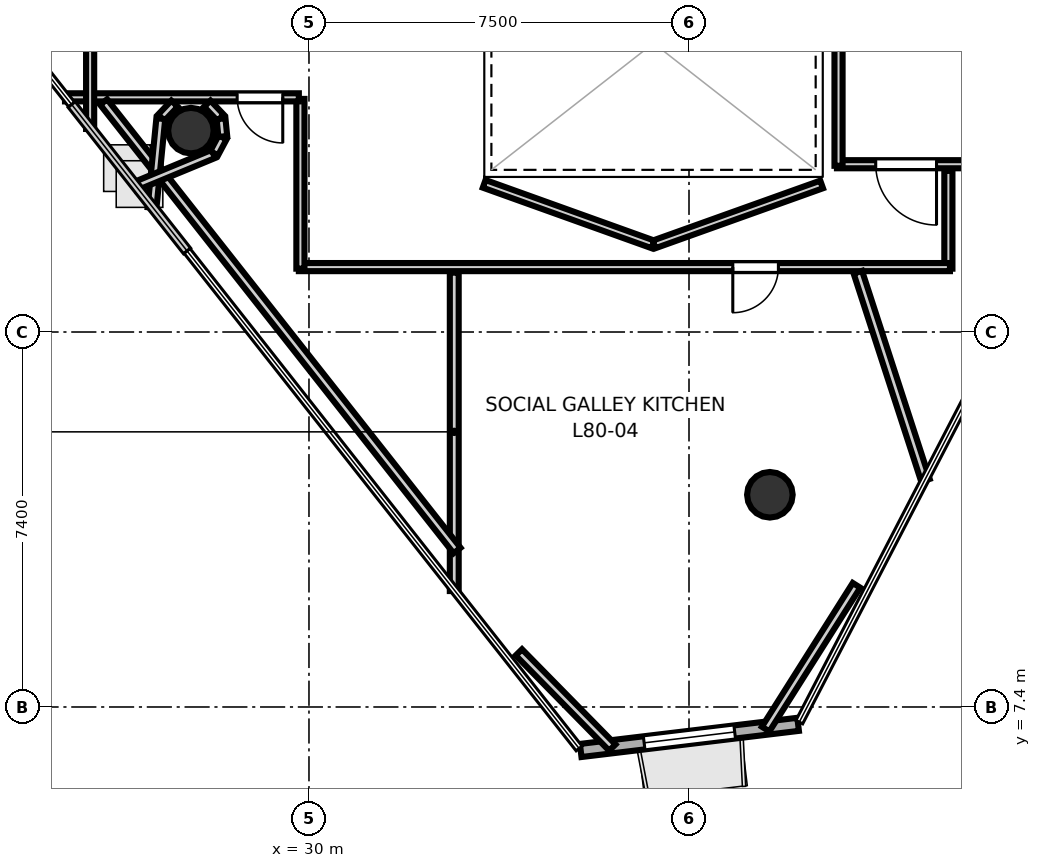
"""IFC4 building model, lengths in metres.
Left out: names, types, materials, properties, quantities, classifications, styles, units other than length and angle.
Written with IfcOpenShell. Run it as: python <this file> out.ifc"""

import sys

from ifc_helpers import new_model, si_unit, direction, frame, frame_2d, origin, origin_2d, place, context, subcontext, project, spatial, rectangle, hollow_circle, extrude, element, fill, save


model = new_model("IFC4")
c1 = context("Model", 3, precision=1e-05, world=origin(), true_north=direction((0.0, 1.0)))
c2 = subcontext(c1, "Body", "Model", "MODEL_VIEW")
j1 = project(units=[si_unit("LENGTHUNIT", "METRE"), si_unit("PLANEANGLEUNIT", "RADIAN")], contexts=[c1])
p1 = place(None, origin())
s1 = spatial("IfcSite", under=j1, at=p1, CompositionType="ELEMENT")
p2 = place(p1, origin())
s2 = spatial("IfcBuilding", under=s1, at=p2, CompositionType="ELEMENT")
p3 = place(p2, frame((0.0, 0.0, 310.2)))
s3 = spatial("IfcBuildingStorey", under=s2, at=p3, CompositionType="ELEMENT", Elevation=310.2)
for number, where, z_axis, x_axis in (
    (1, (27.67, 18.774, 0.0), (0.0, 0.0, 1.0), (1.0, 0.0, 0.0)),
    (2, (39.096, 11.588, 0.0), (0.0, 0.0, 1.0), (1.0, 0.0, 0.0)),
):
    element("IfcColumn", number, at=place(p3, frame(where, z_axis=z_axis, x_axis=x_axis)), inside=s3, PredefinedType="COLUMN", context=c2, shape_type="SweptSolid", body=[
        extrude(hollow_circle(Radius=0.45, WallThickness=0.025, at=origin_2d()), origin(), (0.0, 0.0, 1.0), 3.7),
    ])
p4 = place(p3, frame((35.363, 6.542, 0.0), z_axis=(0.0, 0.0, 1.0), x_axis=(0.992851691793, 0.119354589791, 0.0)))
e3 = element("IfcWall", 3, at=p4, inside=s3, PredefinedType="SOLIDWALL", context=c2, shape_type="SweptSolid", body=[
    extrude(rectangle(XDim=4.322, YDim=0.26, at=frame_2d((2.161, 0.0))), origin(), (0.0, 0.0, 1.0), 3.52),
])
p5 = place(p4, frame((1.261, 0.0, 0.85)))
e4 = element("IfcOpeningElement", 4, at=p5, cuts=e3, PredefinedType="OPENING", context=c2, shape_type="SweptSolid", body=[
    extrude(rectangle(XDim=1.8, YDim=2.1, at=frame_2d((0.9, 1.05))), frame((0.0, 0.14, 0.0), z_axis=(0.0, -1.0, 0.0), x_axis=(1.0, 0.0, 0.0)), (0.0, 0.0, 1.0), 0.28),
])
p6 = place(p3, frame((43.15, 18.111, 0.0), z_axis=(0.0, 0.0, 1.0), x_axis=(-1.0, 0.0, 0.0)))
e5 = element("IfcWall", 5, at=p6, inside=s3, PredefinedType="PARTITIONING", context=c2, shape_type="SweptSolid", body=[
    extrude(rectangle(XDim=2.73, YDim=0.16, at=frame_2d((1.365, 0.0))), origin(), (0.0, 0.0, 1.0), 2.84),
])
p7 = place(p6, frame((0.765, 0.0, 0.0)))
e6 = element("IfcOpeningElement", 6, at=p7, cuts=e5, PredefinedType="OPENING", context=c2, shape_type="SweptSolid", body=[
    extrude(rectangle(XDim=1.2, YDim=2.15, at=frame_2d((0.6, 1.075))), frame((0.0, 0.09, 0.0), z_axis=(0.0, -1.0, 0.0), x_axis=(1.0, 0.0, 0.0)), (0.0, 0.0, 1.0), 0.18),
])
p8 = place(p3, frame((40.451, 18.08, 0.0), z_axis=(0.0, 0.0, 1.0), x_axis=(0.0, 1.0, 0.0)))
e7 = element("IfcWall", 7, at=p8, inside=s3, PredefinedType="PARTITIONING", context=c2, shape_type="SweptSolid", body=[
    extrude(rectangle(XDim=3.32, YDim=0.16, at=frame_2d((1.66, 0.0))), origin(), (0.0, 0.0, 1.0), 2.84),
])
p9 = place(p3, frame((33.458, 17.724, 0.0), z_axis=(0.0, 0.0, 1.0), x_axis=(0.94128854789, -0.337603124408, 0.0)))
e8 = element("IfcWall", 8, at=p9, inside=s3, PredefinedType="PARTITIONING", context=c2, shape_type="SweptSolid", body=[
    extrude(rectangle(XDim=3.54, YDim=0.16, at=frame_2d((1.77, 0.0))), origin(), (0.0, 0.0, 1.0), 2.84),
])
p10 = place(p3, frame((36.81, 16.529, 0.0), z_axis=(0.0, 0.0, 1.0), x_axis=(0.941548344365, 0.33687789364, 0.0)))
e9 = element("IfcWall", 9, at=p10, inside=s3, PredefinedType="PARTITIONING", context=c2, shape_type="SweptSolid", body=[
    extrude(rectangle(XDim=3.513, YDim=0.16, at=frame_2d((1.756, 0.0))), origin(), (0.0, 0.0, 1.0), 2.84),
])
p11 = place(p3, frame((42.619, 17.98, 0.0), z_axis=(0.0, 0.0, 1.0), x_axis=(0.0, -1.0, 0.0)))
e10 = element("IfcWall", 10, at=p11, inside=s3, PredefinedType="PARTITIONING", context=c2, shape_type="SweptSolid", body=[
    extrude(rectangle(XDim=1.93, YDim=0.16, at=frame_2d((0.965, 0.0))), origin(), (0.0, 0.0, 1.0), 2.84),
])
p12 = place(p3, frame((42.65, 16.081, 0.0), z_axis=(0.0, 0.0, 1.0), x_axis=(-1.0, 0.0, 0.0)))
e11 = element("IfcWall", 11, at=p12, inside=s3, PredefinedType="PARTITIONING", context=c2, shape_type="SweptSolid", body=[
    extrude(rectangle(XDim=12.85, YDim=0.16, at=frame_2d((6.425, 0.0))), origin(), (0.0, 0.0, 1.0), 2.84),
])
p13 = place(p12, frame((3.386, 0.0, 0.0)))
e12 = element("IfcOpeningElement", 12, at=p13, cuts=e11, PredefinedType="OPENING", context=c2, shape_type="SweptSolid", body=[
    extrude(rectangle(XDim=0.9, YDim=2.1, at=frame_2d((0.45, 1.05))), frame((0.0, 0.09, 0.0), z_axis=(0.0, -1.0, 0.0), x_axis=(1.0, 0.0, 0.0)), (0.0, 0.0, 1.0), 0.18),
])
p14 = place(p3, frame((29.831, 16.05, 0.0), z_axis=(0.0, 0.0, 1.0), x_axis=(0.0, 1.0, 0.0)))
e13 = element("IfcWall", 13, at=p14, inside=s3, PredefinedType="PARTITIONING", context=c2, shape_type="SweptSolid", body=[
    extrude(rectangle(XDim=3.35, YDim=0.16, at=frame_2d((1.675, 0.0))), origin(), (0.0, 0.0, 1.0), 2.84),
])
p15 = place(p3, frame((29.8, 19.431, 0.0), z_axis=(0.0, 0.0, 1.0), x_axis=(-1.0, 0.0, 0.0)))
e14 = element("IfcWall", 14, at=p15, inside=s3, PredefinedType="PARTITIONING", context=c2, shape_type="SweptSolid", body=[
    extrude(rectangle(XDim=4.615, YDim=0.16, at=frame_2d((2.307, 0.0))), origin(), (0.0, 0.0, 1.0), 2.84),
])
p16 = place(p15, frame((0.317, 0.0, 0.0)))
e15 = element("IfcOpeningElement", 15, at=p16, cuts=e14, PredefinedType="OPENING", context=c2, shape_type="SweptSolid", body=[
    extrude(rectangle(XDim=0.9, YDim=2.1, at=frame_2d((0.45, 1.05))), frame((0.0, 0.09, 0.0), z_axis=(0.0, -1.0, 0.0), x_axis=(1.0, 0.0, 0.0)), (0.0, 0.0, 1.0), 0.18),
])
p17 = place(p3, frame((25.681, 18.807, 0.0), z_axis=(0.0, 0.0, 1.0), x_axis=(0.0, 1.0, 0.0)))
e16 = element("IfcWall", 16, at=p17, inside=s3, PredefinedType="PARTITIONING", context=c2, shape_type="SweptSolid", body=[
    extrude(rectangle(XDim=13.743, YDim=0.16, at=frame_2d((6.872, 0.0))), origin(), (0.0, 0.0, 1.0), 2.84),
])
p18 = place(p3, frame((32.867, 15.971, 0.0), z_axis=(0.0, 0.0, 1.0), x_axis=(0.0, -1.0, 0.0)))
e17 = element("IfcWall", 17, at=p18, inside=s3, PredefinedType="PLUMBINGWALL", context=c2, shape_type="SweptSolid", body=[
    extrude(rectangle(XDim=6.283, YDim=0.175, at=frame_2d((3.142, 0.0))), origin(), (0.0, 0.0, 1.0), 2.84),
])
p19 = place(p3, frame((32.923, 10.488, 0.0), z_axis=(0.0, 0.0, 1.0), x_axis=(-0.618958497861, 0.785423693254, 0.0)))
e18 = element("IfcWall", 18, at=p19, inside=s3, PredefinedType="PLUMBINGWALL", context=c2, shape_type="SweptSolid", body=[
    extrude(rectangle(XDim=11.27, YDim=0.175, at=frame_2d((5.635, 0.0))), origin(), (0.0, 0.0, 1.0), 2.84),
])
p20 = place(p3, frame((27.347, 19.306, 0.0), z_axis=(0.0, 0.0, 1.0), x_axis=(-0.68932010071, -0.724456899171, 0.0)))
e19 = element("IfcWall", 19, at=p20, inside=s3, PredefinedType="PLUMBINGWALL", context=c2, shape_type="SweptSolid", body=[
    extrude(rectangle(XDim=0.382, YDim=0.175, at=frame_2d((0.191, 0.0))), origin(), (0.0, 0.0, 1.0), 2.84),
])
p21 = place(p3, frame((27.076, 19.01, 0.0), z_axis=(0.0, 0.0, 1.0), x_axis=(-0.098092686465, -0.995177283132, 0.0)))
e20 = element("IfcWall", 20, at=p21, inside=s3, PredefinedType="PLUMBINGWALL", context=c2, shape_type="SweptSolid", body=[
    extrude(rectangle(XDim=1.765, YDim=0.175, at=frame_2d((0.882, 0.0))), origin(), (0.0, 0.0, 1.0), 2.84),
])
p22 = place(p3, frame((26.566, 17.673, 0.0), z_axis=(0.0, 0.0, 1.0), x_axis=(0.923945777078, 0.382523464666, 0.0)))
e21 = element("IfcWall", 21, at=p22, inside=s3, PredefinedType="PLUMBINGWALL", context=c2, shape_type="SweptSolid", body=[
    extrude(rectangle(XDim=1.675, YDim=0.175, at=frame_2d((0.837, 0.0))), origin(), (0.0, 0.0, 1.0), 2.84),
])
p23 = place(p3, frame((28.129, 18.328, 0.0), z_axis=(0.0, 0.0, 1.0), x_axis=(0.471589913721, 0.881817981942, 0.0)))
e22 = element("IfcWall", 22, at=p23, inside=s3, PredefinedType="PLUMBINGWALL", context=c2, shape_type="SweptSolid", body=[
    extrude(rectangle(XDim=0.354, YDim=0.175, at=frame_2d((0.177, 0.0))), origin(), (0.0, 0.0, 1.0), 2.84),
])
p24 = place(p3, frame((28.299, 18.658, 0.0), z_axis=(0.0, 0.0, 1.0), x_axis=(-0.097865889817, 0.995199611942, 0.0)))
e23 = element("IfcWall", 23, at=p24, inside=s3, PredefinedType="PLUMBINGWALL", context=c2, shape_type="SweptSolid", body=[
    extrude(rectangle(XDim=0.354, YDim=0.175, at=frame_2d((0.177, 0.0))), origin(), (0.0, 0.0, 1.0), 2.84),
])
p25 = place(p3, frame((28.256, 19.029, 0.0), z_axis=(0.0, 0.0, 1.0), x_axis=(-0.68932010071, 0.724456899171, 0.0)))
e24 = element("IfcWall", 24, at=p25, inside=s3, PredefinedType="PLUMBINGWALL", context=c2, shape_type="SweptSolid", body=[
    extrude(rectangle(XDim=0.382, YDim=0.175, at=frame_2d((0.191, 0.0))), origin(), (0.0, 0.0, 1.0), 2.84),
])
p26 = place(p3, frame((42.167, 11.873, 0.0), z_axis=(0.0, 0.0, 1.0), x_axis=(-0.309025977205, 0.95105359755, 0.0)))
e25 = element("IfcWall", 25, at=p26, inside=s3, PredefinedType="PLUMBINGWALL", context=c2, shape_type="SweptSolid", body=[
    extrude(rectangle(XDim=4.318, YDim=0.175, at=frame_2d((2.159, 0.0))), origin(), (0.0, 0.0, 1.0), 2.84),
])
p27 = place(p3, frame((25.441, 31.07, 0.0), z_axis=(0.0, 0.0, 1.0), x_axis=(-0.067271723884, -0.997734691772, 0.0)))
e26 = element("IfcWall", 26, at=p27, inside=s3, PredefinedType="PLUMBINGWALL", context=c2, shape_type="SweptSolid", body=[
    extrude(rectangle(XDim=11.022, YDim=0.175, at=frame_2d((5.511, 0.0))), origin(), (0.0, 0.0, 1.0), 2.84),
])
p28 = place(p3, frame((40.806, 9.801, 0.0), z_axis=(0.0, 0.0, 1.0), x_axis=(-0.534274846976, -0.845310823241, 0.0)))
e27 = element("IfcWall", 27, at=p28, inside=s3, PredefinedType="PLUMBINGWALL", context=c2, shape_type="SweptSolid", body=[
    extrude(rectangle(XDim=3.356, YDim=0.175, at=frame_2d((1.678, 0.0))), origin(), (0.0, 0.0, 1.0), 2.84),
])
p29 = place(p3, frame((35.987, 6.6, 0.0), z_axis=(0.0, 0.0, 1.0), x_axis=(-0.700632999923, 0.71352182827, 0.0)))
e28 = element("IfcWall", 28, at=p29, inside=s3, PredefinedType="PLUMBINGWALL", context=c2, shape_type="SweptSolid", body=[
    extrude(rectangle(XDim=2.633, YDim=0.175, at=frame_2d((1.316, 0.0))), origin(), (0.0, 0.0, 1.0), 2.84),
])
p30 = place(p7, origin())
e29 = element("IfcDoor", 29, at=p30, inside=s3, OperationType="SINGLE_SWING_LEFT", PredefinedType="DOOR", context=c2, shape_type="SweptSolid", body=[
    extrude(rectangle(XDim=1.2, YDim=2.15, at=frame_2d((0.6, 1.075))), frame((0.0, 0.025, 0.0), z_axis=(0.0, -1.0, 0.0), x_axis=(1.0, 0.0, 0.0)), (0.0, 0.0, 1.0), 0.05),
])
fill(e6, e29)
p31 = place(p16, origin())
e30 = element("IfcDoor", 30, at=p31, inside=s3, OperationType="SINGLE_SWING_LEFT", PredefinedType="DOOR", context=c2, shape_type="SweptSolid", body=[
    extrude(rectangle(XDim=0.9, YDim=2.1, at=frame_2d((0.45, 1.05))), frame((0.0, 0.025, 0.0), z_axis=(0.0, -1.0, 0.0), x_axis=(1.0, 0.0, 0.0)), (0.0, 0.0, 1.0), 0.05),
])
fill(e15, e30)
p32 = place(p13, origin())
e31 = element("IfcDoor", 31, at=p32, inside=s3, OperationType="SINGLE_SWING_RIGHT", PredefinedType="DOOR", context=c2, shape_type="SweptSolid", body=[
    extrude(rectangle(XDim=0.9, YDim=2.1, at=frame_2d((0.45, 1.05))), frame((0.0, 0.025, 0.0), z_axis=(0.0, -1.0, 0.0), x_axis=(1.0, 0.0, 0.0)), (0.0, 0.0, 1.0), 0.05),
])
fill(e12, e31)
p33 = place(p5, origin())
e32 = element("IfcWindow", 32, at=p33, inside=s3, PartitioningType="SINGLE_PANEL", PredefinedType="WINDOW", context=c2, shape_type="SweptSolid", body=[
    extrude(rectangle(XDim=1.8, YDim=2.1, at=frame_2d((0.9, 1.05))), frame((0.0, 0.03, 0.0), z_axis=(0.0, -1.0, 0.0), x_axis=(1.0, 0.0, 0.0)), (0.0, 0.0, 1.0), 0.06),
])
fill(e4, e32)
save(model, sys.argv[1])
